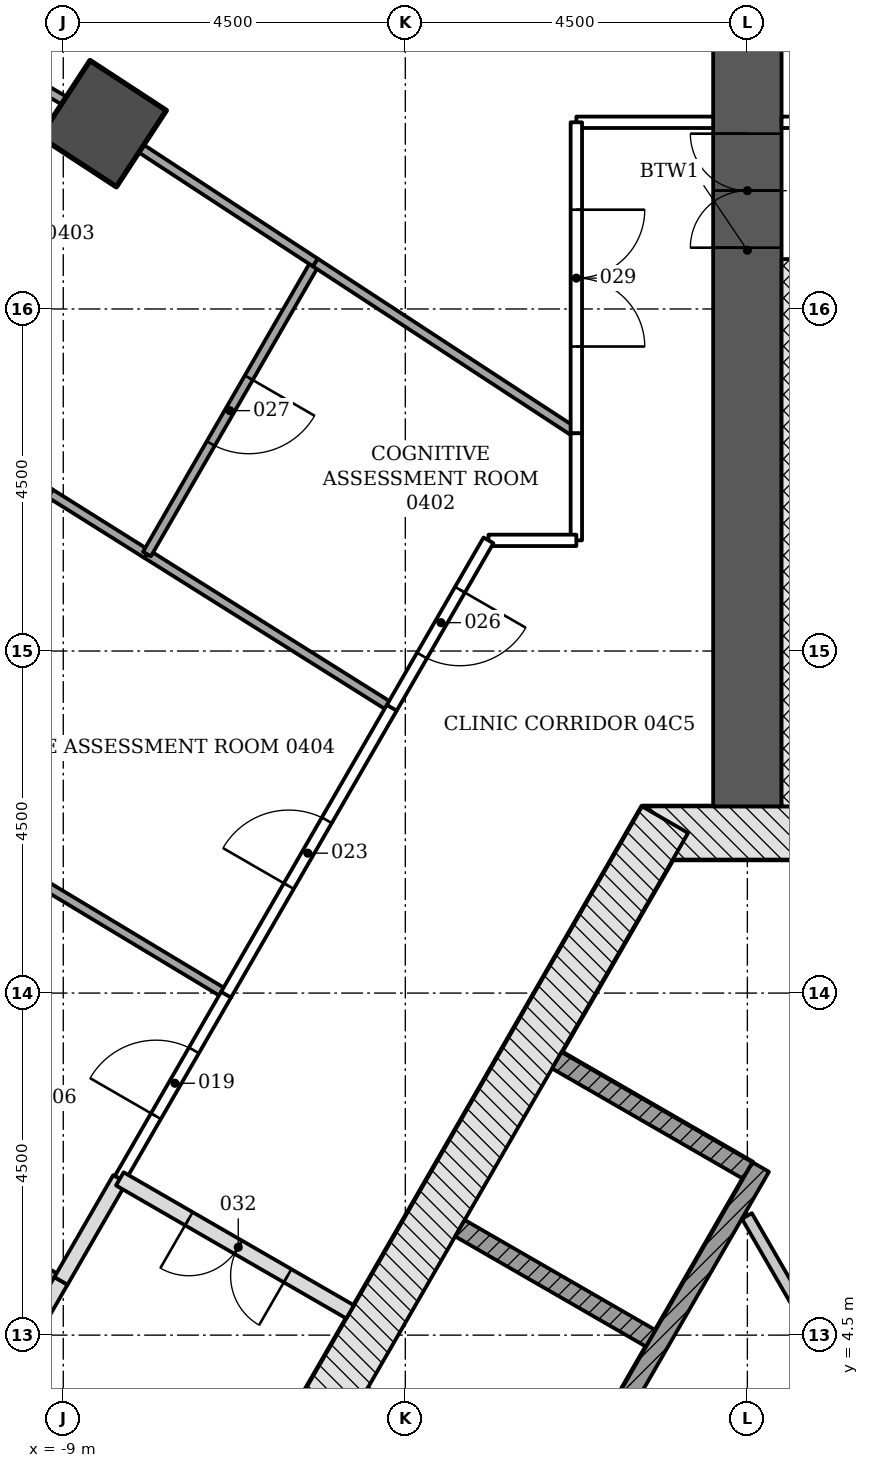
"""IFC4 building model, lengths in metres.
Left out: names, types, materials, properties, quantities, classifications, styles, units other than length and angle.
Written with IfcOpenShell. Run it as: python <this file> out.ifc"""

import sys

from ifc_helpers import new_model, si_unit, direction, frame, frame_2d, origin, origin_2d, place, context, subcontext, project, spatial, rectangle, extrude, element, fill, save


model = new_model("IFC4")
c1 = context("Model", 3, precision=1e-05, world=origin(), true_north=direction((0.0, 1.0)))
c2 = subcontext(c1, "Body", "Model", "MODEL_VIEW")
j1 = project(units=[si_unit("LENGTHUNIT", "METRE"), si_unit("PLANEANGLEUNIT", "RADIAN")], contexts=[c1])
p1 = place(None, origin())
s1 = spatial("IfcSite", under=j1, at=p1, CompositionType="ELEMENT")
p2 = place(p1, origin())
s2 = spatial("IfcBuilding", under=s1, at=p2, CompositionType="ELEMENT")
p3 = place(p2, frame((0.0, 0.0, 19.5)))
s3 = spatial("IfcBuildingStorey", under=s2, at=p3, CompositionType="ELEMENT", Elevation=19.5)
p4 = place(p3, frame((-8.475, 20.438, -0.25), z_axis=(0.0, 0.0, 1.0), x_axis=(-0.836867705394, 0.547405191489, 0.0)))
e1 = element("IfcColumn", 1, at=p4, inside=s3, PredefinedType="COLUMN", context=c2, shape_type="SweptSolid", body=[
    extrude(rectangle(XDim=1.2, YDim=1.2, at=origin_2d()), origin(), (0.0, 0.0, 1.0), 4.55),
])
p5 = place(p3, frame((1.386, 11.106, -0.25), z_axis=(0.0, 0.0, 1.0), x_axis=(-1.0, 0.0, 0.0)))
e2 = element("IfcWall", 2, at=p5, inside=s3, PredefinedType="SHEAR", context=c2, shape_type="SweptSolid", body=[
    extrude(rectangle(XDim=2.771, YDim=0.7, at=frame_2d((1.386, 0.0))), origin(), (0.0, 0.0, 1.0), 4.55),
])
p6 = place(p3, frame((-1.083, 11.281, -0.25), z_axis=(0.0, 0.0, 1.0), x_axis=(-0.500001446645, -0.866024568562, 0.0)))
e3 = element("IfcWall", 3, at=p6, inside=s3, PredefinedType="SHEAR", context=c2, shape_type="SweptSolid", body=[
    extrude(rectangle(XDim=18.458, YDim=0.7, at=frame_2d((9.229, 0.0))), origin(), (0.0, 0.0, 1.0), 4.55),
])
p7 = place(p6, frame((8.979, 0.0, 0.25)))
e4 = element("IfcOpeningElement", 4, at=p7, cuts=e3, PredefinedType="OPENING", context=c2, shape_type="SweptSolid", body=[
    extrude(rectangle(XDim=1.2, YDim=2.1, at=frame_2d((0.6, 1.05))), frame((0.0, 0.36, 0.0), z_axis=(0.0, -1.0, 0.0), x_axis=(1.0, 0.0, 0.0)), (0.0, 0.0, 1.0), 0.72),
])
p8 = place(p6, frame((11.029, 0.0, 0.25)))
e5 = element("IfcOpeningElement", 5, at=p8, cuts=e3, PredefinedType="OPENING", context=c2, shape_type="SweptSolid", body=[
    extrude(rectangle(XDim=1.2, YDim=2.1, at=frame_2d((0.6, 1.05))), frame((0.0, 0.36, 0.0), z_axis=(0.0, -1.0, 0.0), x_axis=(1.0, 0.0, 0.0)), (0.0, 0.0, 1.0), 0.72),
])
p9 = place(p3, frame((0.0, 11.456, -0.25), z_axis=(0.0, 0.0, 1.0), x_axis=(0.0, 1.0, 0.0)))
e6 = element("IfcWall", 6, at=p9, inside=s3, PredefinedType="SHEAR", context=c2, shape_type="SweptSolid", body=[
    extrude(rectangle(XDim=14.633, YDim=0.9, at=frame_2d((7.316, 0.0))), origin(), (0.0, 0.0, 1.0), 4.55),
])
p10 = place(p9, frame((7.35, 0.0, 0.25)))
e7 = element("IfcOpeningElement", 7, at=p10, cuts=e6, PredefinedType="OPENING", context=c2, shape_type="SweptSolid", body=[
    extrude(rectangle(XDim=1.5, YDim=2.1, at=frame_2d((0.75, 1.05))), frame((0.0, 0.46, 0.0), z_axis=(0.0, -1.0, 0.0), x_axis=(1.0, 0.0, 0.0)), (0.0, 0.0, 1.0), 0.92),
])
p11 = place(p3, frame((-2.506, 8.115, -0.25), z_axis=(0.0, 0.0, 1.0), x_axis=(0.865996321171, -0.50005036918, 0.0)))
e8 = element("IfcWall", 8, at=p11, inside=s3, PredefinedType="PARTITIONING", context=c2, shape_type="SweptSolid", body=[
    extrude(rectangle(XDim=2.9, YDim=0.25, at=frame_2d((1.45, 0.0))), origin(), (0.0, 0.0, 1.0), 4.55),
])
for number, where, z_axis, x_axis in (
    (9, (-3.781, 5.907, -0.25), (0.0, 0.0, 1.0), (0.866, -0.5, 0.0)),
    (10, (-5.056, 3.699, -0.25), (0.0, 0.0, 1.0), (0.866, -0.5, 0.0)),
):
    element("IfcWall", number, at=place(p3, frame(where, z_axis=z_axis, x_axis=x_axis)), inside=s3, PredefinedType="PARTITIONING", context=c2, shape_type="SweptSolid", body=[
        extrude(rectangle(XDim=2.9, YDim=0.25, at=frame_2d((1.45, 0.0))), origin(), (0.0, 0.0, 1.0), 4.55),
    ])
p12 = place(p3, frame((0.176, 6.711, 0.0), z_axis=(0.0, 0.0, 1.0), x_axis=(-0.500004227369, -0.866022963098, 0.0)))
e11 = element("IfcWall", 11, at=p12, inside=s3, PredefinedType="PARTITIONING", context=c2, shape_type="SweptSolid", body=[
    extrude(rectangle(XDim=11.8, YDim=0.25, at=frame_2d((5.9, 0.0))), origin(), (0.0, 0.0, 1.0), 4.3),
])
p13 = place(p3, frame((2.099, 2.42, 0.0), z_axis=(0.0, 0.0, 1.0), x_axis=(-0.499998449073, 0.866026299211, 0.0)))
e12 = element("IfcWall", 12, at=p13, inside=s3, PredefinedType="PARTITIONING", context=c2, shape_type="SweptSolid", body=[
    extrude(rectangle(XDim=4.211, YDim=0.15, at=frame_2d((2.106, 0.0))), origin(), (0.0, 0.0, 1.0), 4.3),
])
p14 = place(p3, frame((1.018, 11.456, -0.25), z_axis=(0.0, 0.0, 1.0), x_axis=(0.0, 1.0, 0.0)))
e13 = element("IfcWall", 13, at=p14, inside=s3, PredefinedType="SHEAR", context=c2, shape_type="SweptSolid", body=[
    extrude(rectangle(XDim=7.2, YDim=1.136, at=frame_2d((3.6, 0.0))), origin(), (0.0, 0.0, 1.0), 4.55),
])
p15 = place(p3, frame((-9.031, 5.213, 0.0), z_axis=(0.0, 0.0, 1.0), x_axis=(-0.500044734646, -0.865999574684, 0.0)))
e14 = element("IfcWall", 14, at=p15, inside=s3, PredefinedType="PARTITIONING", context=c2, shape_type="SweptSolid", body=[
    extrude(rectangle(XDim=4.35, YDim=0.2, at=frame_2d((2.175, 0.0))), origin(), (0.0, 0.0, 1.0), 3.688),
])
p16 = place(p3, frame((-8.256, 6.555, 0.0), z_axis=(0.0, 0.0, 1.0), x_axis=(-0.499904469662, -0.866080551226, 0.0)))
e15 = element("IfcWall", 15, at=p16, inside=s3, PredefinedType="PARTITIONING", context=c2, shape_type="SweptSolid", body=[
    extrude(rectangle(XDim=1.548, YDim=0.2, at=frame_2d((0.774, 0.0))), origin(), (0.0, 0.0, 1.0), 3.688),
])
p17 = place(p3, frame((-5.226, 4.806, 0.0), z_axis=(0.0, 0.0, 1.0), x_axis=(-0.865949687125, 0.500131122175, 0.0)))
e16 = element("IfcWall", 16, at=p17, inside=s3, PredefinedType="PARTITIONING", context=c2, shape_type="SweptSolid", body=[
    extrude(rectangle(XDim=3.499, YDim=0.2, at=frame_2d((1.75, 0.0))), origin(), (0.0, 0.0, 1.0), 4.3),
])
p18 = place(p17, frame((0.95, 0.0, 0.0)))
e17 = element("IfcOpeningElement", 17, at=p18, cuts=e16, PredefinedType="OPENING", context=c2, shape_type="SweptSolid", body=[
    extrude(rectangle(XDim=1.5, YDim=2.1, at=frame_2d((0.75, 1.05))), frame((0.0, 0.11, 0.0), z_axis=(0.0, -1.0, 0.0), x_axis=(1.0, 0.0, 0.0)), (0.0, 0.0, 1.0), 0.22),
])
p19 = place(p3, frame((7.136, 20.456, 0.0), z_axis=(0.0, 0.0, 1.0), x_axis=(-1.0, 0.0, 0.0)))
e18 = element("IfcWall", 18, at=p19, inside=s3, PredefinedType="PARTITIONING", context=c2, shape_type="SweptSolid", body=[
    extrude(rectangle(XDim=6.686, YDim=0.15, at=frame_2d((3.343, 0.0))), origin(), (0.0, 0.0, 1.0), 3.843),
])
p20 = place(p19, frame((2.45, 0.0, 0.0)))
e19 = element("IfcOpeningElement", 19, at=p20, cuts=e18, PredefinedType="OPENING", context=c2, shape_type="SweptSolid", body=[
    extrude(rectangle(XDim=1.8, YDim=2.1, at=frame_2d((0.9, 1.05))), frame((0.0, 0.085, 0.0), z_axis=(0.0, -1.0, 0.0), x_axis=(1.0, 0.0, 0.0)), (0.0, 0.0, 1.0), 0.17),
])
p21 = place(p3, frame((-9.032, 5.214, 0.0), z_axis=(0.0, 0.0, 1.0), x_axis=(-0.866038805516, 0.499976786802, 0.0)))
e20 = element("IfcWall", 20, at=p21, inside=s3, PredefinedType="PARTITIONING", context=c2, shape_type="SweptSolid", body=[
    extrude(rectangle(XDim=4.598, YDim=0.12, at=frame_2d((2.299, 0.0))), origin(), (0.0, 0.0, 1.0), 3.688),
])
p22 = place(p3, frame((-6.857, 8.983, 0.0), z_axis=(0.0, 0.0, 1.0), x_axis=(-0.856691171268, 0.515829658968, 0.0)))
e21 = element("IfcWall", 21, at=p22, inside=s3, PredefinedType="PARTITIONING", context=c2, shape_type="SweptSolid", body=[
    extrude(rectangle(XDim=4.6, YDim=0.12, at=frame_2d((2.3, 0.0))), origin(), (0.0, 0.0, 1.0), 3.698),
])
p23 = place(p3, frame((-8.256, 6.558, 0.0), z_axis=(0.0, 0.0, 1.0), x_axis=(0.500081734942, 0.86597820895, 0.0)))
e22 = element("IfcWall", 22, at=p23, inside=s3, PredefinedType="PARTITIONING", context=c2, shape_type="SweptSolid", body=[
    extrude(rectangle(XDim=2.804, YDim=0.15, at=frame_2d((1.402, 0.0))), origin(), (0.0, 0.0, 1.0), 3.698),
])
p24 = place(p23, frame((0.95, 0.0, 0.0)))
e23 = element("IfcOpeningElement", 23, at=p24, cuts=e22, PredefinedType="OPENING", context=c2, shape_type="SweptSolid", body=[
    extrude(rectangle(XDim=1.0, YDim=2.1, at=frame_2d((0.5, 1.05))), frame((0.0, 0.085, 0.0), z_axis=(0.0, -1.0, 0.0), x_axis=(1.0, 0.0, 0.0)), (0.0, 0.0, 1.0), 0.17),
])
p25 = place(p3, frame((-6.858, 8.979, 0.0), z_axis=(0.0, 0.0, 1.0), x_axis=(0.500105111742, 0.865964708986, 0.0)))
e24 = element("IfcWall", 24, at=p25, inside=s3, PredefinedType="PARTITIONING", context=c2, shape_type="SweptSolid", body=[
    extrude(rectangle(XDim=4.363, YDim=0.15, at=frame_2d((2.181, 0.0))), origin(), (0.0, 0.0, 1.0), 3.698),
])
p26 = place(p25, frame((1.65, 0.0, 0.0)))
e25 = element("IfcOpeningElement", 25, at=p26, cuts=e24, PredefinedType="OPENING", context=c2, shape_type="SweptSolid", body=[
    extrude(rectangle(XDim=1.0, YDim=2.1, at=frame_2d((0.5, 1.05))), frame((0.0, 0.085, 0.0), z_axis=(0.0, -1.0, 0.0), x_axis=(1.0, 0.0, 0.0)), (0.0, 0.0, 1.0), 0.17),
])
p27 = place(p3, frame((-9.17, 15.572, 0.0), z_axis=(0.0, 0.0, 1.0), x_axis=(-0.499902881486, -0.866081467924, 0.0)))
e26 = element("IfcWall", 26, at=p27, inside=s3, PredefinedType="PARTITIONING", context=c2, shape_type="SweptSolid", body=[
    extrude(rectangle(XDim=4.451, YDim=0.12, at=frame_2d((2.226, 0.0))), origin(), (0.0, 0.0, 1.0), 3.698),
])
p28 = place(p27, frame((1.75, 0.0, 0.0)))
e27 = element("IfcOpeningElement", 27, at=p28, cuts=e26, PredefinedType="OPENING", context=c2, shape_type="SweptSolid", body=[
    extrude(rectangle(XDim=1.0, YDim=2.1, at=frame_2d((0.5, 1.05))), frame((0.0, 0.07, 0.0), z_axis=(0.0, -1.0, 0.0), x_axis=(1.0, 0.0, 0.0)), (0.0, 0.0, 1.0), 0.14),
])
p29 = place(p3, frame((-4.68, 12.753, 0.0), z_axis=(0.0, 0.0, 1.0), x_axis=(-0.846844902979, 0.531839929206, 0.0)))
e28 = element("IfcWall", 28, at=p29, inside=s3, PredefinedType="PARTITIONING", context=c2, shape_type="SweptSolid", body=[
    extrude(rectangle(XDim=3.8, YDim=0.12, at=frame_2d((1.9, 0.0))), origin(), (0.0, 0.0, 1.0), 3.698),
])
p30 = place(p3, frame((-7.901, 14.776, 0.0), z_axis=(0.0, 0.0, 1.0), x_axis=(-0.847002237732, 0.531589323892, 0.0)))
e29 = element("IfcWall", 29, at=p30, inside=s3, PredefinedType="PARTITIONING", context=c2, shape_type="SweptSolid", body=[
    extrude(rectangle(XDim=1.503, YDim=0.12, at=frame_2d((0.751, 0.0))), origin(), (0.0, 0.0, 1.0), 3.698),
])
p31 = place(p3, frame((-2.25, 16.365, 0.0), z_axis=(0.0, 0.0, 1.0), x_axis=(0.0, -1.0, 0.0)))
e30 = element("IfcWall", 30, at=p31, inside=s3, PredefinedType="PARTITIONING", context=c2, shape_type="SweptSolid", body=[
    extrude(rectangle(XDim=1.409, YDim=0.15, at=frame_2d((0.705, 0.0))), origin(), (0.0, 0.0, 1.0), 3.767),
])
p32 = place(p3, frame((-2.25, 14.956, 0.0), z_axis=(0.0, 0.0, 1.0), x_axis=(-1.0, 0.0, 0.0)))
e31 = element("IfcWall", 31, at=p32, inside=s3, PredefinedType="PARTITIONING", context=c2, shape_type="SweptSolid", body=[
    extrude(rectangle(XDim=1.156, YDim=0.15, at=frame_2d((0.578, 0.0))), origin(), (0.0, 0.0, 1.0), 4.3),
])
p33 = place(p3, frame((-3.406, 14.956, 0.0), z_axis=(0.0, 0.0, 1.0), x_axis=(-0.499999364504, -0.866025770688, 0.0)))
e32 = element("IfcWall", 32, at=p33, inside=s3, PredefinedType="PARTITIONING", context=c2, shape_type="SweptSolid", body=[
    extrude(rectangle(XDim=2.544, YDim=0.15, at=frame_2d((1.272, 0.0))), origin(), (0.0, 0.0, 1.0), 3.698),
])
p34 = place(p33, frame((0.75, 0.0, 0.0)))
e33 = element("IfcOpeningElement", 33, at=p34, cuts=e32, PredefinedType="OPENING", context=c2, shape_type="SweptSolid", body=[
    extrude(rectangle(XDim=1.0, YDim=2.1, at=frame_2d((0.5, 1.05))), frame((0.0, 0.085, 0.0), z_axis=(0.0, -1.0, 0.0), x_axis=(1.0, 0.0, 0.0)), (0.0, 0.0, 1.0), 0.17),
])
p35 = place(p3, frame((-0.45, 20.456, 0.0), z_axis=(0.0, 0.0, 1.0), x_axis=(-1.0, 0.0, 0.0)))
e34 = element("IfcWall", 34, at=p35, inside=s3, PredefinedType="PARTITIONING", context=c2, shape_type="SweptSolid", body=[
    extrude(rectangle(XDim=1.8, YDim=0.15, at=frame_2d((0.9, 0.0))), origin(), (0.0, 0.0, 1.0), 3.843),
])
p36 = place(p3, frame((-2.25, 20.456, 0.0), z_axis=(0.0, 0.0, 1.0), x_axis=(0.0, -1.0, 0.0)))
e35 = element("IfcWall", 35, at=p36, inside=s3, PredefinedType="PARTITIONING", context=c2, shape_type="SweptSolid", body=[
    extrude(rectangle(XDim=4.089, YDim=0.15, at=frame_2d((2.044, 0.0))), origin(), (0.0, 0.0, 1.0), 3.767),
])
p37 = place(p36, frame((1.15, 0.0, 0.0)))
e36 = element("IfcOpeningElement", 36, at=p37, cuts=e35, PredefinedType="OPENING", context=c2, shape_type="SweptSolid", body=[
    extrude(rectangle(XDim=1.8, YDim=2.1, at=frame_2d((0.9, 1.05))), frame((0.0, 0.085, 0.0), z_axis=(0.0, -1.0, 0.0), x_axis=(1.0, 0.0, 0.0)), (0.0, 0.0, 1.0), 0.17),
])
p38 = place(p3, frame((-9.166, 15.571, 0.0), z_axis=(0.0, 0.0, 1.0), x_axis=(-0.84701751501, 0.531564981227, 0.0)))
e37 = element("IfcWall", 37, at=p38, inside=s3, PredefinedType="PARTITIONING", context=c2, shape_type="SweptSolid", body=[
    extrude(rectangle(XDim=2.045, YDim=0.12, at=frame_2d((1.022, 0.0))), origin(), (0.0, 0.0, 1.0), 3.18),
])
p39 = place(p3, frame((-5.684, 18.611, 0.0), z_axis=(0.0, 0.0, 1.0), x_axis=(-0.500099413844, -0.865967999567, 0.0)))
e38 = element("IfcWall", 38, at=p39, inside=s3, PredefinedType="PARTITIONING", context=c2, shape_type="SweptSolid", body=[
    extrude(rectangle(XDim=4.429, YDim=0.12, at=frame_2d((2.214, 0.0))), origin(), (0.0, 0.0, 1.0), 3.698),
])
p40 = place(p39, frame((1.75, 0.0, 0.0)))
e39 = element("IfcOpeningElement", 39, at=p40, cuts=e38, PredefinedType="OPENING", context=c2, shape_type="SweptSolid", body=[
    extrude(rectangle(XDim=1.0, YDim=2.1, at=frame_2d((0.5, 1.05))), frame((0.0, 0.07, 0.0), z_axis=(0.0, -1.0, 0.0), x_axis=(1.0, 0.0, 0.0)), (0.0, 0.0, 1.0), 0.14),
])
p41 = place(p3, frame((-2.252, 16.367, 0.0), z_axis=(0.0, 0.0, 1.0), x_axis=(-0.836925574982, 0.547316710819, 0.0)))
e40 = element("IfcWall", 40, at=p41, inside=s3, PredefinedType="PARTITIONING", context=c2, shape_type="SweptSolid", body=[
    extrude(rectangle(XDim=4.102, YDim=0.12, at=frame_2d((2.051, 0.0))), origin(), (0.0, 0.0, 1.0), 3.767),
])
p42 = place(p3, frame((-8.992, 20.743, 0.0), z_axis=(0.0, 0.0, 1.0), x_axis=(-0.861228913487, 0.508217235613, 0.0)))
e41 = element("IfcWall", 41, at=p42, inside=s3, PredefinedType="PARTITIONING", context=c2, shape_type="SweptSolid", body=[
    extrude(rectangle(XDim=2.94, YDim=0.12, at=frame_2d((1.47, 0.0))), origin(), (0.0, 0.0, 1.0), 3.683),
])
p43 = place(p3, frame((-5.685, 18.612, 0.0), z_axis=(0.0, 0.0, 1.0), x_axis=(-0.836813840242, 0.547487531163, 0.0)))
e42 = element("IfcWall", 42, at=p43, inside=s3, PredefinedType="PARTITIONING", context=c2, shape_type="SweptSolid", body=[
    extrude(rectangle(XDim=2.734, YDim=0.12, at=frame_2d((1.367, 0.0))), origin(), (0.0, 0.0, 1.0), 3.767),
])
p44 = place(p24, origin())
e43 = element("IfcDoor", 43, at=p44, inside=s3, OperationType="SINGLE_SWING_RIGHT", PredefinedType="DOOR", context=c2, shape_type="SweptSolid", body=[
    extrude(rectangle(XDim=1.0, YDim=2.1, at=frame_2d((0.5, 1.05))), frame((0.0, 0.025, 0.0), z_axis=(0.0, -1.0, 0.0), x_axis=(1.0, 0.0, 0.0)), (0.0, 0.0, 1.0), 0.05),
])
fill(e23, e43)
p45 = place(p26, origin())
e44 = element("IfcDoor", 44, at=p45, inside=s3, OperationType="SINGLE_SWING_LEFT", PredefinedType="DOOR", context=c2, shape_type="SweptSolid", body=[
    extrude(rectangle(XDim=1.0, YDim=2.1, at=frame_2d((0.5, 1.05))), frame((0.0, 0.025, 0.0), z_axis=(0.0, -1.0, 0.0), x_axis=(1.0, 0.0, 0.0)), (0.0, 0.0, 1.0), 0.05),
])
fill(e25, e44)
p46 = place(p34, origin())
e45 = element("IfcDoor", 45, at=p46, inside=s3, OperationType="SINGLE_SWING_RIGHT", PredefinedType="DOOR", context=c2, shape_type="SweptSolid", body=[
    extrude(rectangle(XDim=1.0, YDim=2.1, at=frame_2d((0.5, 1.05))), frame((0.0, 0.025, 0.0), z_axis=(0.0, -1.0, 0.0), x_axis=(1.0, 0.0, 0.0)), (0.0, 0.0, 1.0), 0.05),
])
fill(e33, e45)
p47 = place(p40, origin())
e46 = element("IfcDoor", 46, at=p47, inside=s3, OperationType="SINGLE_SWING_LEFT", PredefinedType="DOOR", context=c2, shape_type="SweptSolid", body=[
    extrude(rectangle(XDim=1.0, YDim=2.1, at=frame_2d((0.5, 1.05))), frame((0.0, 0.025, 0.0), z_axis=(0.0, -1.0, 0.0), x_axis=(1.0, 0.0, 0.0)), (0.0, 0.0, 1.0), 0.05),
])
fill(e39, e46)
p48 = place(p37, origin())
e47 = element("IfcDoor", 47, at=p48, inside=s3, OperationType="DOUBLE_DOOR_SINGLE_SWING", PredefinedType="DOOR", context=c2, shape_type="SweptSolid", body=[
    extrude(rectangle(XDim=1.8, YDim=2.1, at=frame_2d((0.9, 1.05))), frame((0.0, 0.025, 0.0), z_axis=(0.0, -1.0, 0.0), x_axis=(1.0, 0.0, 0.0)), (0.0, 0.0, 1.0), 0.05),
])
fill(e36, e47)
p49 = place(p18, origin())
e48 = element("IfcDoor", 48, at=p49, inside=s3, OperationType="DOUBLE_DOOR_SINGLE_SWING", PredefinedType="DOOR", context=c2, shape_type="SweptSolid", body=[
    extrude(rectangle(XDim=1.5, YDim=2.1, at=frame_2d((0.75, 1.05))), frame((0.0, 0.025, 0.0), z_axis=(0.0, -1.0, 0.0), x_axis=(1.0, 0.0, 0.0)), (0.0, 0.0, 1.0), 0.05),
])
fill(e17, e48)
p50 = place(p10, origin())
e49 = element("IfcDoor", 49, at=p50, inside=s3, OperationType="DOUBLE_DOOR_SINGLE_SWING", PredefinedType="DOOR", context=c2, shape_type="SweptSolid", body=[
    extrude(rectangle(XDim=1.5, YDim=2.1, at=frame_2d((0.75, 1.05))), frame((0.0, 0.025, 0.0), z_axis=(0.0, -1.0, 0.0), x_axis=(1.0, 0.0, 0.0)), (0.0, 0.0, 1.0), 0.05),
])
fill(e7, e49)
save(model, sys.argv[1])
